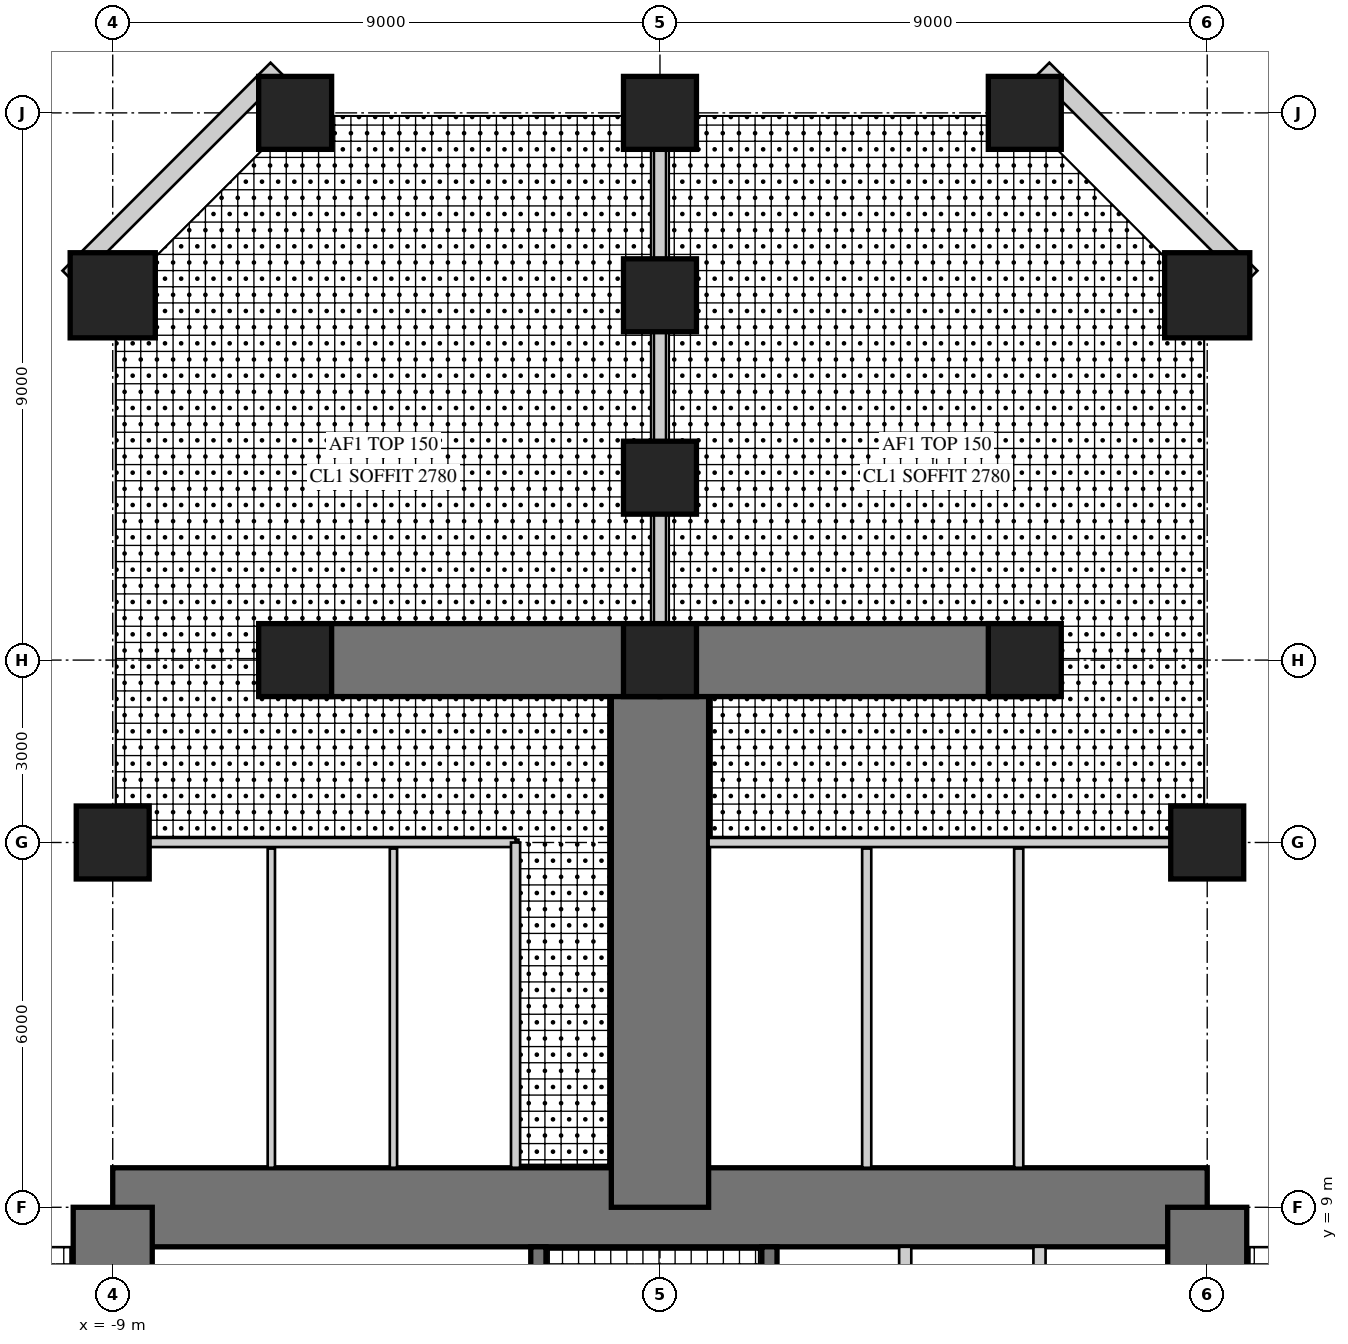
"""IFC4 building model, lengths in metres.
Left out: names, types, materials, properties, quantities, classifications, styles, units other than length and angle.
Written with IfcOpenShell. Run it as: python <this file> out.ifc"""

import sys

from ifc_helpers import new_model, si_unit, direction, frame, frame_2d, origin, origin_2d, place, context, subcontext, project, spatial, rectangle, hollow_rectangle, extrude, element, fill, save


model = new_model("IFC4")
c1 = context("Model", 3, precision=1e-05, world=origin(), true_north=direction((0.0, 1.0)))
c2 = subcontext(c1, "Body", "Model", "MODEL_VIEW")
j1 = project(units=[si_unit("LENGTHUNIT", "METRE"), si_unit("PLANEANGLEUNIT", "RADIAN")], contexts=[c1])
p1 = place(None, origin())
s1 = spatial("IfcSite", under=j1, at=p1, CompositionType="ELEMENT")
p2 = place(p1, origin())
s2 = spatial("IfcBuilding", under=s1, at=p2, CompositionType="ELEMENT")
p3 = place(p2, frame((0.0, 0.0, 79.5)))
s3 = spatial("IfcBuildingStorey", under=s2, at=p3, CompositionType="ELEMENT", Elevation=79.5)
p4 = place(p3, frame((9.0, 9.0, 0.0), z_axis=(0.0, 0.0, 1.0), x_axis=(-1.0, 0.0, 0.0)))
e1 = element("IfcWall", 1, at=p4, inside=s3, PredefinedType="SHEAR", context=c2, shape_type="SweptSolid", body=[
    extrude(rectangle(XDim=18.0, YDim=1.3, at=frame_2d((9.0, 0.0))), origin(), (0.0, 0.0, 1.0), 4.0),
])
p5 = place(p4, frame((9.8, 0.0, 0.0)))
e2 = element("IfcOpeningElement", 2, at=p5, cuts=e1, PredefinedType="OPENING", context=c2, shape_type="SweptSolid", body=[
    extrude(rectangle(XDim=1.0, YDim=2.4, at=frame_2d((0.5, 1.2))), frame((0.0, 0.66, 0.0), z_axis=(0.0, -1.0, 0.0), x_axis=(1.0, 0.0, 0.0)), (0.0, 0.0, 1.0), 1.32),
])
p6 = place(p3, frame((9.0, -9.0, 0.0), z_axis=(0.0, 0.0, 1.0), x_axis=(0.0, 1.0, 0.0)))
e3 = element("IfcWall", 3, at=p6, inside=s3, PredefinedType="SHEAR", context=c2, shape_type="SweptSolid", body=[
    extrude(rectangle(XDim=18.0, YDim=1.3, at=frame_2d((9.0, 0.0))), origin(), (0.0, 0.0, 1.0), 4.0),
])
p7 = place(p6, frame((9.8, 0.0, 0.0)))
e4 = element("IfcOpeningElement", 4, at=p7, cuts=e3, PredefinedType="OPENING", context=c2, shape_type="SweptSolid", body=[
    extrude(rectangle(XDim=1.0, YDim=2.4, at=frame_2d((0.5, 1.2))), frame((0.0, 0.66, 0.0), z_axis=(0.0, -1.0, 0.0), x_axis=(1.0, 0.0, 0.0)), (0.0, 0.0, 1.0), 1.32),
])
p8 = place(p3, frame((-9.0, 9.0, 0.0), z_axis=(0.0, 0.0, 1.0), x_axis=(0.0, -1.0, 0.0)))
e5 = element("IfcWall", 5, at=p8, inside=s3, PredefinedType="SHEAR", context=c2, shape_type="SweptSolid", body=[
    extrude(rectangle(XDim=18.0, YDim=1.3, at=frame_2d((9.0, 0.0))), origin(), (0.0, 0.0, 1.0), 4.0),
])
p9 = place(p8, frame((9.8, 0.0, 0.0)))
e6 = element("IfcOpeningElement", 6, at=p9, cuts=e5, PredefinedType="OPENING", context=c2, shape_type="SweptSolid", body=[
    extrude(rectangle(XDim=1.0, YDim=2.4, at=frame_2d((0.5, 1.2))), frame((0.0, 0.66, 0.0), z_axis=(0.0, -1.0, 0.0), x_axis=(1.0, 0.0, 0.0)), (0.0, 0.0, 1.0), 1.32),
])
p10 = place(p3, frame((1.8, 1.875, 0.0), z_axis=(0.0, 0.0, 1.0), x_axis=(0.0, 1.0, 0.0)))
e7 = element("IfcWall", 7, at=p10, inside=s3, PredefinedType="SHEAR", context=c2, shape_type="SweptSolid", body=[
    extrude(rectangle(XDim=6.475, YDim=0.25, at=frame_2d((3.238, 0.0))), origin(), (0.0, 0.0, 1.0), 4.0),
])
p11 = place(p10, frame((1.875, 0.0, 0.0)))
e8 = element("IfcOpeningElement", 8, at=p11, cuts=e7, PredefinedType="OPENING", context=c2, shape_type="SweptSolid", body=[
    extrude(rectangle(XDim=1.6, YDim=2.4, at=frame_2d((0.8, 1.2))), frame((0.0, 0.135, 0.0), z_axis=(0.0, -1.0, 0.0), x_axis=(1.0, 0.0, 0.0)), (0.0, 0.0, 1.0), 0.27),
])
for number, where, z_axis, x_axis in (
    (9, (4.033, 5.975, 0.0), (0.0, 0.0, 1.0), (0.0, 1.0, 0.0)),
    (10, (6.242, 5.975, 0.0), (0.0, 0.0, 1.0), (0.0, 1.0, 0.0)),
):
    element("IfcWall", number, at=place(p3, frame(where, z_axis=z_axis, x_axis=x_axis)), inside=s3, PredefinedType="PARTITIONING", context=c2, shape_type="SweptSolid", body=[
        extrude(rectangle(XDim=2.375, YDim=0.2, at=frame_2d((1.188, 0.0))), origin(), (0.0, 0.0, 1.0), 4.0),
    ])
p12 = place(p3, frame((-2.0, 1.675, 0.0), z_axis=(0.0, 0.0, 1.0), x_axis=(0.0, 1.0, 0.0)))
e11 = element("IfcWall", 11, at=p12, inside=s3, PredefinedType="SHEAR", context=c2, shape_type="SweptSolid", body=[
    extrude(rectangle(XDim=6.675, YDim=0.25, at=frame_2d((3.337, 0.0))), origin(), (0.0, 0.0, 1.0), 4.0),
])
p13 = place(p12, frame((0.725, 0.0, 0.0)))
e12 = element("IfcOpeningElement", 12, at=p13, cuts=e11, PredefinedType="OPENING", context=c2, shape_type="SweptSolid", body=[
    extrude(rectangle(XDim=1.0, YDim=2.1, at=frame_2d((0.5, 1.05))), frame((0.0, 0.135, 0.0), z_axis=(0.0, -1.0, 0.0), x_axis=(1.0, 0.0, 0.0)), (0.0, 0.0, 1.0), 0.27),
])
p14 = place(p3, frame((0.0, 9.0, 0.0), z_axis=(0.0, 0.0, 1.0), x_axis=(0.0, 1.0, 0.0)))
e13 = element("IfcWall", 13, at=p14, inside=s3, PredefinedType="SHEAR", context=c2, shape_type="SweptSolid", body=[
    extrude(rectangle(XDim=9.0, YDim=1.6, at=frame_2d((4.5, 0.0))), origin(), (0.0, 0.0, 1.0), 4.0),
])
for number, where, z_axis, x_axis in (
    (14, (0.0, 18.0, 0.0), (0.0, 0.0, 1.0), (-1.0, 0.0, 0.0)),
    (15, (0.0, 18.0, 0.0), (0.0, 0.0, 1.0), (1.0, 0.0, 0.0)),
):
    element("IfcWall", number, at=place(p3, frame(where, z_axis=z_axis, x_axis=x_axis)), inside=s3, PredefinedType="SHEAR", context=c2, shape_type="SweptSolid", body=[
        extrude(rectangle(XDim=6.0, YDim=1.2, at=frame_2d((3.0, 0.0))), origin(), (0.0, 0.0, 1.0), 4.0),
    ])
p15 = place(p3, frame((9.0, 15.0, 0.0), z_axis=(0.0, 0.0, 1.0), x_axis=(1.0, 0.0, 0.0)))
e16 = element("IfcColumn", 16, at=p15, inside=s3, PredefinedType="COLUMN", context=c2, shape_type="SweptSolid", body=[
    extrude(rectangle(XDim=1.2, YDim=1.2, at=origin_2d()), origin(), (0.0, 0.0, 1.0), 4.0),
])
p16 = place(p3, frame((9.0, 24.0, 0.0), z_axis=(0.0, 0.0, 1.0), x_axis=(1.0, 0.0, 0.0)))
e17 = element("IfcColumn", 17, at=p16, inside=s3, PredefinedType="COLUMN", context=c2, shape_type="SweptSolid", body=[
    extrude(rectangle(XDim=1.4, YDim=1.4, at=origin_2d()), origin(), (0.0, 0.0, 1.0), 4.0),
])
p17 = place(p3, frame((-9.0, 15.0, 0.0), z_axis=(0.0, 0.0, 1.0), x_axis=(1.0, 0.0, 0.0)))
e18 = element("IfcColumn", 18, at=p17, inside=s3, PredefinedType="COLUMN", context=c2, shape_type="SweptSolid", body=[
    extrude(rectangle(XDim=1.2, YDim=1.2, at=origin_2d()), origin(), (0.0, 0.0, 1.0), 4.0),
])
p18 = place(p3, frame((-9.0, 24.0, 0.0), z_axis=(0.0, 0.0, 1.0), x_axis=(1.0, 0.0, 0.0)))
e19 = element("IfcColumn", 19, at=p18, inside=s3, PredefinedType="COLUMN", context=c2, shape_type="SweptSolid", body=[
    extrude(rectangle(XDim=1.4, YDim=1.4, at=origin_2d()), origin(), (0.0, 0.0, 1.0), 4.0),
])
for number, where, z_axis, x_axis in (
    (20, (6.0, 27.0, 0.0), (0.0, 0.0, 1.0), (1.0, 0.0, 0.0)),
    (21, (0.0, 27.0, 0.0), (0.0, 0.0, 1.0), (1.0, 0.0, 0.0)),
    (22, (-6.0, 27.0, 0.0), (0.0, 0.0, 1.0), (1.0, 0.0, 0.0)),
    (23, (6.0, 18.0, 0.0), (0.0, 0.0, 1.0), (1.0, 0.0, 0.0)),
    (24, (0.0, 18.0, 0.0), (0.0, 0.0, 1.0), (1.0, 0.0, 0.0)),
    (25, (-6.0, 18.0, 0.0), (0.0, 0.0, 1.0), (1.0, 0.0, 0.0)),
    (26, (0.0, 21.0, 0.0), (0.0, 0.0, 1.0), (1.0, 0.0, 0.0)),
    (27, (0.0, 24.0, 0.0), (0.0, 0.0, 1.0), (1.0, 0.0, 0.0)),
):
    element("IfcColumn", number, at=place(p3, frame(where, z_axis=z_axis, x_axis=x_axis)), inside=s3, PredefinedType="COLUMN", context=c2, shape_type="SweptSolid", body=[
        extrude(rectangle(XDim=1.2, YDim=1.2, at=origin_2d()), origin(), (0.0, 0.0, 1.0), 4.0),
    ])
p19 = place(p3, frame((9.72, 24.298, 0.0), z_axis=(0.0, 0.0, 1.0), x_axis=(-0.707106781187, 0.707106781187, 0.0)))
e28 = element("IfcWall", 28, at=p19, inside=s3, PredefinedType="SOLIDWALL", context=c2, shape_type="SweptSolid", body=[
    extrude(rectangle(XDim=4.839, YDim=0.3, at=frame_2d((2.419, 0.0))), origin(), (0.0, 0.0, 1.0), 3.8),
])
p20 = place(p19, frame((1.969, 0.0, 0.3)))
e29 = element("IfcOpeningElement", 29, at=p20, cuts=e28, PredefinedType="OPENING", context=c2, shape_type="SweptSolid", body=[
    extrude(rectangle(XDim=0.9, YDim=2.4, at=frame_2d((0.45, 1.2))), frame((0.0, 0.16, 0.0), z_axis=(0.0, -1.0, 0.0), x_axis=(1.0, 0.0, 0.0)), (0.0, 0.0, 1.0), 0.32),
])
p21 = place(p3, frame((-6.298, 27.72, 0.0), z_axis=(0.0, 0.0, 1.0), x_axis=(-0.707106781187, -0.707106781187, 0.0)))
e30 = element("IfcWall", 30, at=p21, inside=s3, PredefinedType="SOLIDWALL", context=c2, shape_type="SweptSolid", body=[
    extrude(rectangle(XDim=4.839, YDim=0.3, at=frame_2d((2.419, 0.0))), origin(), (0.0, 0.0, 1.0), 3.8),
])
p22 = place(p21, frame((1.969, 0.0, 0.3)))
e31 = element("IfcOpeningElement", 31, at=p22, cuts=e30, PredefinedType="OPENING", context=c2, shape_type="SweptSolid", body=[
    extrude(rectangle(XDim=0.9, YDim=2.4, at=frame_2d((0.45, 1.2))), frame((0.0, 0.16, 0.0), z_axis=(0.0, -1.0, 0.0), x_axis=(1.0, 0.0, 0.0)), (0.0, 0.0, 1.0), 0.32),
])
p23 = place(p3, frame((-2.375, 15.0, 0.0), z_axis=(0.0, 0.0, 1.0), x_axis=(-1.0, 0.0, 0.0)))
e32 = element("IfcWall", 32, at=p23, inside=s3, PredefinedType="PARTITIONING", context=c2, shape_type="SweptSolid", body=[
    extrude(rectangle(XDim=6.025, YDim=0.15, at=frame_2d((3.012, 0.0))), origin(), (0.0, 0.0, 1.0), 2.95),
])
p24 = place(p23, frame((0.504, 0.0, 0.0)))
e33 = element("IfcOpeningElement", 33, at=p24, cuts=e32, PredefinedType="OPENING", context=c2, shape_type="SweptSolid", body=[
    extrude(rectangle(XDim=1.0, YDim=2.1, at=frame_2d((0.5, 1.05))), frame((0.0, 0.085, 0.0), z_axis=(0.0, -1.0, 0.0), x_axis=(1.0, 0.0, 0.0)), (0.0, 0.0, 1.0), 0.17),
])
p25 = place(p23, frame((2.512, 0.0, 0.0)))
e34 = element("IfcOpeningElement", 34, at=p25, cuts=e32, PredefinedType="OPENING", context=c2, shape_type="SweptSolid", body=[
    extrude(rectangle(XDim=1.0, YDim=2.1, at=frame_2d((0.5, 1.05))), frame((0.0, 0.085, 0.0), z_axis=(0.0, -1.0, 0.0), x_axis=(1.0, 0.0, 0.0)), (0.0, 0.0, 1.0), 0.17),
])
p26 = place(p23, frame((4.521, 0.0, 0.0)))
e35 = element("IfcOpeningElement", 35, at=p26, cuts=e32, PredefinedType="OPENING", context=c2, shape_type="SweptSolid", body=[
    extrude(rectangle(XDim=1.0, YDim=2.1, at=frame_2d((0.5, 1.05))), frame((0.0, 0.085, 0.0), z_axis=(0.0, -1.0, 0.0), x_axis=(1.0, 0.0, 0.0)), (0.0, 0.0, 1.0), 0.17),
])
p27 = place(p3, frame((-2.375, 9.65, 0.0), z_axis=(0.0, 0.0, 1.0), x_axis=(0.0, 1.0, 0.0)))
e36 = element("IfcWall", 36, at=p27, inside=s3, PredefinedType="PARTITIONING", context=c2, shape_type="SweptSolid", body=[
    extrude(rectangle(XDim=5.35, YDim=0.15, at=frame_2d((2.675, 0.0))), origin(), (0.0, 0.0, 1.0), 3.8),
])
for number, where, z_axis, x_axis in (
    (37, (-4.383, 9.65, 0.0), (0.0, 0.0, 1.0), (0.0, 1.0, 0.0)),
    (38, (-6.392, 9.65, 0.0), (0.0, 0.0, 1.0), (0.0, 1.0, 0.0)),
):
    element("IfcWall", number, at=place(p3, frame(where, z_axis=z_axis, x_axis=x_axis)), inside=s3, PredefinedType="PLUMBINGWALL", context=c2, shape_type="SweptSolid", body=[
        extrude(rectangle(XDim=5.25, YDim=0.12, at=frame_2d((2.625, 0.0))), origin(), (0.0, 0.0, 1.0), 3.8),
    ])
p28 = place(p3, frame((8.4, 15.0, 0.0), z_axis=(0.0, 0.0, 1.0), x_axis=(-1.0, 0.0, 0.0)))
e39 = element("IfcWall", 39, at=p28, inside=s3, PredefinedType="PARTITIONING", context=c2, shape_type="SweptSolid", body=[
    extrude(rectangle(XDim=7.6, YDim=0.15, at=frame_2d((3.8, 0.0))), origin(), (0.0, 0.0, 1.0), 2.95),
])
p29 = place(p28, frame((0.75, 0.0, 0.0)))
e40 = element("IfcOpeningElement", 40, at=p29, cuts=e39, PredefinedType="OPENING", context=c2, shape_type="SweptSolid", body=[
    extrude(rectangle(XDim=1.0, YDim=2.1, at=frame_2d((0.5, 1.05))), frame((0.0, 0.085, 0.0), z_axis=(0.0, -1.0, 0.0), x_axis=(1.0, 0.0, 0.0)), (0.0, 0.0, 1.0), 0.17),
])
p30 = place(p28, frame((3.25, 0.0, 0.0)))
e41 = element("IfcOpeningElement", 41, at=p30, cuts=e39, PredefinedType="OPENING", context=c2, shape_type="SweptSolid", body=[
    extrude(rectangle(XDim=1.0, YDim=2.1, at=frame_2d((0.5, 1.05))), frame((0.0, 0.085, 0.0), z_axis=(0.0, -1.0, 0.0), x_axis=(1.0, 0.0, 0.0)), (0.0, 0.0, 1.0), 0.17),
])
p31 = place(p28, frame((5.8, 0.0, 0.0)))
e42 = element("IfcOpeningElement", 42, at=p31, cuts=e39, PredefinedType="OPENING", context=c2, shape_type="SweptSolid", body=[
    extrude(rectangle(XDim=1.0, YDim=2.1, at=frame_2d((0.5, 1.05))), frame((0.0, 0.085, 0.0), z_axis=(0.0, -1.0, 0.0), x_axis=(1.0, 0.0, 0.0)), (0.0, 0.0, 1.0), 0.17),
])
p32 = place(p3, frame((3.4, 9.65, 0.0), z_axis=(0.0, 0.0, 1.0), x_axis=(0.0, 1.0, 0.0)))
e43 = element("IfcWall", 43, at=p32, inside=s3, PredefinedType="PARTITIONING", context=c2, shape_type="SweptSolid", body=[
    extrude(rectangle(XDim=5.25, YDim=0.15, at=frame_2d((2.625, 0.0))), origin(), (0.0, 0.0, 1.0), 3.8),
])
p33 = place(p3, frame((5.9, 9.65, 0.0), z_axis=(0.0, 0.0, 1.0), x_axis=(0.0, 1.0, 0.0)))
e44 = element("IfcWall", 44, at=p33, inside=s3, PredefinedType="PARTITIONING", context=c2, shape_type="SweptSolid", body=[
    extrude(rectangle(XDim=5.25, YDim=0.15, at=frame_2d((2.625, 0.0))), origin(), (0.0, 0.0, 1.0), 3.0),
])
p34 = place(p3, frame((0.0, 18.0, 0.0), z_axis=(0.0, 0.0, 1.0), x_axis=(0.0, 1.0, 0.0)))
e45 = element("IfcWall", 45, at=p34, inside=s3, PredefinedType="SOLIDWALL", context=c2, shape_type="SweptSolid", body=[
    extrude(rectangle(XDim=3.0, YDim=0.2, at=frame_2d((1.5, 0.0))), origin(), (0.0, 0.0, 1.0), 3.8),
])
p35 = place(p34, frame((0.9, 0.0, 0.0)))
e46 = element("IfcOpeningElement", 46, at=p35, cuts=e45, PredefinedType="OPENING", context=c2, shape_type="SweptSolid", body=[
    extrude(rectangle(XDim=1.0, YDim=2.2, at=frame_2d((0.5, 1.1))), frame((0.0, 0.11, 0.0), z_axis=(0.0, -1.0, 0.0), x_axis=(1.0, 0.0, 0.0)), (0.0, 0.0, 1.0), 0.22),
])
p36 = place(p3, frame((0.0, 21.0, 0.0), z_axis=(0.0, 0.0, 1.0), x_axis=(0.0, 1.0, 0.0)))
e47 = element("IfcWall", 47, at=p36, inside=s3, PredefinedType="SOLIDWALL", context=c2, shape_type="SweptSolid", body=[
    extrude(rectangle(XDim=6.0, YDim=0.2, at=frame_2d((3.0, 0.0))), origin(), (0.0, 0.0, 1.0), 2.9),
])
p37 = place(p20, origin())
e48 = element("IfcWindow", 48, at=p37, inside=s3, PartitioningType="SINGLE_PANEL", PredefinedType="WINDOW", context=c2, shape_type="SweptSolid", body=[
    extrude(hollow_rectangle(XDim=0.9, YDim=2.4, WallThickness=0.06, at=frame_2d((0.45, 1.2))), frame((0.0, 0.03, 0.0), z_axis=(0.0, -1.0, 0.0), x_axis=(1.0, 0.0, 0.0)), (0.0, 0.0, 1.0), 0.06),
    extrude(rectangle(XDim=0.779, YDim=2.279, at=frame_2d((0.45, 1.2))), frame((0.0, 0.03, 0.0), z_axis=(0.0, -1.0, 0.0), x_axis=(1.0, 0.0, 0.0)), (0.0, 0.0, 1.0), 0.06),
])
fill(e29, e48)
p38 = place(p22, origin())
e49 = element("IfcWindow", 49, at=p38, inside=s3, PartitioningType="SINGLE_PANEL", PredefinedType="WINDOW", context=c2, shape_type="SweptSolid", body=[
    extrude(hollow_rectangle(XDim=0.9, YDim=2.4, WallThickness=0.06, at=frame_2d((0.45, 1.2))), frame((0.0, 0.03, 0.0), z_axis=(0.0, -1.0, 0.0), x_axis=(1.0, 0.0, 0.0)), (0.0, 0.0, 1.0), 0.06),
    extrude(rectangle(XDim=0.779, YDim=2.279, at=frame_2d((0.45, 1.2))), frame((0.0, 0.03, 0.0), z_axis=(0.0, -1.0, 0.0), x_axis=(1.0, 0.0, 0.0)), (0.0, 0.0, 1.0), 0.06),
])
fill(e31, e49)
p39 = place(p24, origin())
e50 = element("IfcDoor", 50, at=p39, inside=s3, OperationType="SINGLE_SWING_LEFT", PredefinedType="DOOR", context=c2, shape_type="SweptSolid", body=[
    extrude(rectangle(XDim=1.0, YDim=2.1, at=frame_2d((0.5, 1.05))), frame((0.0, 0.025, 0.0), z_axis=(0.0, -1.0, 0.0), x_axis=(1.0, 0.0, 0.0)), (0.0, 0.0, 1.0), 0.05),
])
fill(e33, e50)
p40 = place(p25, origin())
e51 = element("IfcDoor", 51, at=p40, inside=s3, OperationType="SINGLE_SWING_LEFT", PredefinedType="DOOR", context=c2, shape_type="SweptSolid", body=[
    extrude(rectangle(XDim=1.0, YDim=2.1, at=frame_2d((0.5, 1.05))), frame((0.0, 0.025, 0.0), z_axis=(0.0, -1.0, 0.0), x_axis=(1.0, 0.0, 0.0)), (0.0, 0.0, 1.0), 0.05),
])
fill(e34, e51)
p41 = place(p26, origin())
e52 = element("IfcDoor", 52, at=p41, inside=s3, OperationType="SINGLE_SWING_LEFT", PredefinedType="DOOR", context=c2, shape_type="SweptSolid", body=[
    extrude(rectangle(XDim=1.0, YDim=2.1, at=frame_2d((0.5, 1.05))), frame((0.0, 0.025, 0.0), z_axis=(0.0, -1.0, 0.0), x_axis=(1.0, 0.0, 0.0)), (0.0, 0.0, 1.0), 0.05),
])
fill(e35, e52)
p42 = place(p29, origin())
e53 = element("IfcDoor", 53, at=p42, inside=s3, OperationType="SINGLE_SWING_RIGHT", PredefinedType="DOOR", context=c2, shape_type="SweptSolid", body=[
    extrude(rectangle(XDim=1.0, YDim=2.1, at=frame_2d((0.5, 1.05))), frame((0.0, 0.025, 0.0), z_axis=(0.0, -1.0, 0.0), x_axis=(1.0, 0.0, 0.0)), (0.0, 0.0, 1.0), 0.05),
])
fill(e40, e53)
p43 = place(p30, origin())
e54 = element("IfcDoor", 54, at=p43, inside=s3, OperationType="SINGLE_SWING_LEFT", PredefinedType="DOOR", context=c2, shape_type="SweptSolid", body=[
    extrude(rectangle(XDim=1.0, YDim=2.1, at=frame_2d((0.5, 1.05))), frame((0.0, 0.025, 0.0), z_axis=(0.0, -1.0, 0.0), x_axis=(1.0, 0.0, 0.0)), (0.0, 0.0, 1.0), 0.05),
])
fill(e41, e54)
p44 = place(p31, origin())
e55 = element("IfcDoor", 55, at=p44, inside=s3, OperationType="SINGLE_SWING_LEFT", PredefinedType="DOOR", context=c2, shape_type="SweptSolid", body=[
    extrude(rectangle(XDim=1.0, YDim=2.1, at=frame_2d((0.5, 1.05))), frame((0.0, 0.025, 0.0), z_axis=(0.0, -1.0, 0.0), x_axis=(1.0, 0.0, 0.0)), (0.0, 0.0, 1.0), 0.05),
])
fill(e42, e55)
p45 = place(p35, frame((1.0, 0.0, 0.0), z_axis=(0.0, 0.0, 1.0), x_axis=(-1.0, 0.0, 0.0)))
e56 = element("IfcDoor", 56, at=p45, inside=s3, OperationType="SINGLE_SWING_RIGHT", PredefinedType="DOOR", context=c2, shape_type="SweptSolid", body=[
    extrude(rectangle(XDim=1.0, YDim=2.2, at=frame_2d((0.5, 1.1))), frame((0.0, 0.025, 0.0), z_axis=(0.0, -1.0, 0.0), x_axis=(1.0, 0.0, 0.0)), (0.0, 0.0, 1.0), 0.05),
])
fill(e46, e56)
p46 = place(p5, frame((1.0, 0.0, 0.0), z_axis=(0.0, 0.0, 1.0), x_axis=(-1.0, 0.0, 0.0)))
e57 = element("IfcDoor", 57, at=p46, inside=s3, OperationType="SINGLE_SWING_RIGHT", PredefinedType="DOOR", context=c2, shape_type="SweptSolid", body=[
    extrude(rectangle(XDim=1.0, YDim=2.4, at=frame_2d((0.5, 1.2))), frame((0.0, -0.005, 0.0), z_axis=(0.0, -1.0, 0.0), x_axis=(1.0, 0.0, 0.0)), (0.0, 0.0, 1.0), 0.05),
])
fill(e2, e57)
save(model, sys.argv[1])
